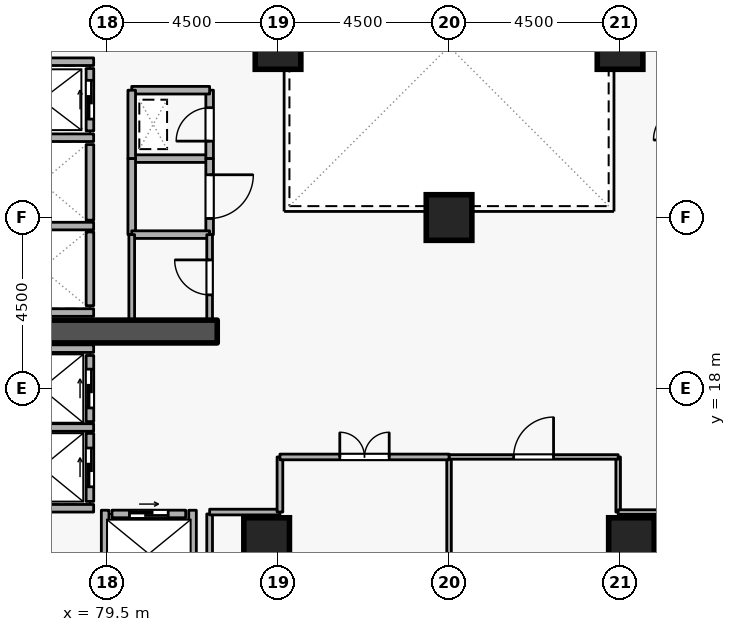
"""IFC4 building model, lengths in metres.
Left out: names, types, materials, properties, quantities, classifications, styles, units other than length and angle.
Written with IfcOpenShell. Run it as: python <this file> out.ifc"""

import sys

from ifc_helpers import new_model, si_unit, direction, frame, frame_2d, origin, origin_2d, place, context, subcontext, project, spatial, rectangle, extrude, element, fill, save


model = new_model("IFC4")
c1 = context("Model", 3, precision=1e-05, world=origin(), true_north=direction((0.0, 1.0)))
c2 = subcontext(c1, "Body", "Model", "MODEL_VIEW")
j1 = project(units=[si_unit("LENGTHUNIT", "METRE"), si_unit("PLANEANGLEUNIT", "RADIAN")], contexts=[c1])
p1 = place(None, origin())
s1 = spatial("IfcSite", under=j1, at=p1, CompositionType="ELEMENT")
p2 = place(p1, origin())
s2 = spatial("IfcBuilding", under=s1, at=p2, CompositionType="ELEMENT")
p3 = place(p2, frame((0.0, 0.0, 98.1)))
s3 = spatial("IfcBuildingStorey", under=s2, at=p3, CompositionType="ELEMENT", Elevation=98.1)
p4 = place(p3, frame((76.7, 19.5, 0.0), z_axis=(0.0, 0.0, 1.0), x_axis=(1.0, 0.0, 0.0)))
e1 = element("IfcWall", 1, at=p4, inside=s3, PredefinedType="SHEAR", context=c2, shape_type="SweptSolid", body=[
    extrude(rectangle(XDim=5.7, YDim=0.6, at=frame_2d((2.85, 0.0))), origin(), (0.0, 0.0, 1.0), 3.6),
])
for number, where, z_axis, x_axis in (
    (2, (93.3, 14.0, 0.0), (0.0, 0.0, 1.0), (1.0, 0.0, 0.0)),
    (3, (83.7, 14.0, 0.0), (0.0, 0.0, 1.0), (1.0, 0.0, 0.0)),
    (4, (93.0, 27.0, 0.0), (0.0, 0.0, 1.0), (1.0, 0.0, 0.0)),
    (5, (84.0, 27.0, 0.0), (0.0, 0.0, 1.0), (1.0, 0.0, 0.0)),
    (6, (88.5, 22.5, 0.0), (0.0, 0.0, 1.0), (1.0, 0.0, 0.0)),
):
    element("IfcColumn", number, at=place(p3, frame(where, z_axis=z_axis, x_axis=x_axis)), inside=s3, PredefinedType="COLUMN", context=c2, shape_type="SweptSolid", body=[
        extrude(rectangle(XDim=1.2, YDim=1.2, at=origin_2d()), origin(), (0.0, 0.0, 1.0), 3.6),
    ])
p5 = place(p3, frame((79.05, 24.78, 0.0), z_axis=(0.0, 0.0, 1.0), x_axis=(0.0, 1.0, 0.0)))
e7 = element("IfcWall", 7, at=p5, inside=s3, PredefinedType="STANDARD", context=c2, shape_type="SweptSolid", body=[
    extrude(rectangle(XDim=1.64, YDim=0.2, at=frame_2d((0.82, 0.0))), origin(), (0.0, 0.0, 1.0), 3.3),
])
p6 = place(p5, frame((0.31, 0.0, 0.0)))
e8 = element("IfcOpeningElement", 8, at=p6, cuts=e7, PredefinedType="OPENING", context=c2, shape_type="SweptSolid", body=[
    extrude(rectangle(XDim=1.02, YDim=2.06, at=frame_2d((0.51, 1.03))), frame((0.0, 0.11, 0.0), z_axis=(0.0, -1.0, 0.0), x_axis=(1.0, 0.0, 0.0)), (0.0, 0.0, 1.0), 0.22),
])
p7 = place(p3, frame((79.05, 22.43, 0.0), z_axis=(0.0, 0.0, 1.0), x_axis=(0.0, 1.0, 0.0)))
e9 = element("IfcWall", 9, at=p7, inside=s3, PredefinedType="STANDARD", context=c2, shape_type="SweptSolid", body=[
    extrude(rectangle(XDim=1.99, YDim=0.2, at=frame_2d((0.995, 0.0))), origin(), (0.0, 0.0, 1.0), 3.3),
])
p8 = place(p3, frame((79.05, 20.18, 0.0), z_axis=(0.0, 0.0, 1.0), x_axis=(0.0, 1.0, 0.0)))
e10 = element("IfcWall", 10, at=p8, inside=s3, PredefinedType="STANDARD", context=c2, shape_type="SweptSolid", body=[
    extrude(rectangle(XDim=1.94, YDim=0.2, at=frame_2d((0.97, 0.0))), origin(), (0.0, 0.0, 1.0), 3.3),
])
p9 = place(p3, frame((79.05, 17.13, 0.0), z_axis=(0.0, 0.0, 1.0), x_axis=(0.0, 1.0, 0.0)))
e11 = element("IfcWall", 11, at=p9, inside=s3, PredefinedType="STANDARD", context=c2, shape_type="SweptSolid", body=[
    extrude(rectangle(XDim=1.74, YDim=0.2, at=frame_2d((0.87, 0.0))), origin(), (0.0, 0.0, 1.0), 3.3),
])
p10 = place(p9, frame((0.36, 0.0, 0.0)))
e12 = element("IfcOpeningElement", 12, at=p10, cuts=e11, PredefinedType="OPENING", context=c2, shape_type="SweptSolid", body=[
    extrude(rectangle(XDim=1.02, YDim=2.06, at=frame_2d((0.51, 1.03))), frame((0.0, 0.11, 0.0), z_axis=(0.0, -1.0, 0.0), x_axis=(1.0, 0.0, 0.0)), (0.0, 0.0, 1.0), 0.22),
])
p11 = place(p3, frame((79.05, 15.03, 0.0), z_axis=(0.0, 0.0, 1.0), x_axis=(0.0, 1.0, 0.0)))
e13 = element("IfcWall", 13, at=p11, inside=s3, PredefinedType="STANDARD", context=c2, shape_type="SweptSolid", body=[
    extrude(rectangle(XDim=1.79, YDim=0.2, at=frame_2d((0.895, 0.0))), origin(), (0.0, 0.0, 1.0), 3.3),
])
p12 = place(p11, frame((0.385, 0.0, 0.0)))
e14 = element("IfcOpeningElement", 14, at=p12, cuts=e13, PredefinedType="OPENING", context=c2, shape_type="SweptSolid", body=[
    extrude(rectangle(XDim=1.02, YDim=2.06, at=frame_2d((0.51, 1.03))), frame((0.0, 0.11, 0.0), z_axis=(0.0, -1.0, 0.0), x_axis=(1.0, 0.0, 0.0)), (0.0, 0.0, 1.0), 0.22),
])
p13 = place(p3, frame((79.63, 14.7, 0.0), z_axis=(0.0, 0.0, 1.0), x_axis=(1.0, 0.0, 0.0)))
e15 = element("IfcWall", 15, at=p13, inside=s3, PredefinedType="STANDARD", context=c2, shape_type="SweptSolid", body=[
    extrude(rectangle(XDim=1.94, YDim=0.2, at=frame_2d((0.97, 0.0))), origin(), (0.0, 0.0, 1.0), 3.3),
])
p14 = place(p13, frame((0.46, 0.0, 0.0)))
e16 = element("IfcOpeningElement", 16, at=p14, cuts=e15, PredefinedType="OPENING", context=c2, shape_type="SweptSolid", body=[
    extrude(rectangle(XDim=1.02, YDim=2.06, at=frame_2d((0.51, 1.03))), frame((0.0, 0.11, 0.0), z_axis=(0.0, -1.0, 0.0), x_axis=(1.0, 0.0, 0.0)), (0.0, 0.0, 1.0), 0.22),
])
for number, where, z_axis, x_axis in (
    (17, (76.712, 26.6, 0.0), (0.0, 0.0, 1.0), (1.0, 0.0, 0.0)),
    (18, (76.712, 24.6, 0.0), (0.0, 0.0, 1.0), (1.0, 0.0, 0.0)),
    (19, (76.712, 22.275, 0.0), (0.0, 0.0, 1.0), (1.0, 0.0, 0.0)),
    (20, (76.712, 20.0, 0.0), (0.0, 0.0, 1.0), (1.0, 0.0, 0.0)),
):
    element("IfcWall", number, at=place(p3, frame(where, z_axis=z_axis, x_axis=x_axis)), inside=s3, PredefinedType="STANDARD", context=c2, shape_type="SweptSolid", body=[
        extrude(rectangle(XDim=2.436, YDim=0.2, at=frame_2d((1.218, 0.0))), origin(), (0.0, 0.0, 1.0), 3.3),
    ])
p15 = place(p3, frame((76.402, 19.05, 0.0), z_axis=(0.0, 0.0, 1.0), x_axis=(1.0, 0.0, 0.0)))
e21 = element("IfcWall", 21, at=p15, inside=s3, PredefinedType="STANDARD", context=c2, shape_type="SweptSolid", body=[
    extrude(rectangle(XDim=2.746, YDim=0.2, at=frame_2d((1.373, 0.0))), origin(), (0.0, 0.0, 1.0), 2.505),
])
p16 = place(p3, frame((76.402, 16.975, 0.0), z_axis=(0.0, 0.0, 1.0), x_axis=(1.0, 0.0, 0.0)))
e22 = element("IfcWall", 22, at=p16, inside=s3, PredefinedType="STANDARD", context=c2, shape_type="SweptSolid", body=[
    extrude(rectangle(XDim=2.746, YDim=0.2, at=frame_2d((1.373, 0.0))), origin(), (0.0, 0.0, 1.0), 3.3),
])
p17 = place(p3, frame((76.512, 14.85, 0.0), z_axis=(0.0, 0.0, 1.0), x_axis=(1.0, 0.0, 0.0)))
e23 = element("IfcWall", 23, at=p17, inside=s3, PredefinedType="STANDARD", context=c2, shape_type="SweptSolid", body=[
    extrude(rectangle(XDim=2.636, YDim=0.2, at=frame_2d((1.318, 0.0))), origin(), (0.0, 0.0, 1.0), 3.3),
])
for number, where, z_axis, x_axis in (
    (24, (81.75, 12.612, 0.0), (0.0, 0.0, 1.0), (0.0, 1.0, 0.0)),
    (25, (79.45, 12.612, 0.0), (0.0, 0.0, 1.0), (0.0, 1.0, 0.0)),
):
    element("IfcWall", number, at=place(p3, frame(where, z_axis=z_axis, x_axis=x_axis)), inside=s3, PredefinedType="STANDARD", context=c2, shape_type="SweptSolid", body=[
        extrude(rectangle(XDim=2.186, YDim=0.2, at=frame_2d((1.093, 0.0))), origin(), (0.0, 0.0, 1.0), 3.3),
    ])
p18 = place(p3, frame((80.15, 24.05, 0.0), z_axis=(0.0, 0.0, 1.0), x_axis=(1.0, 0.0, 0.0)))
e26 = element("IfcWall", 26, at=p18, inside=s3, PredefinedType="STANDARD", context=c2, shape_type="SweptSolid", body=[
    extrude(rectangle(XDim=2.05, YDim=0.2, at=frame_2d((1.025, 0.0))), origin(), (0.0, 0.0, 1.0), 3.3),
])
p19 = place(p3, frame((82.2, 24.05, 0.0), z_axis=(0.0, 0.0, 1.0), x_axis=(0.0, 1.0, 0.0)))
e27 = element("IfcWall", 27, at=p19, inside=s3, PredefinedType="STANDARD", context=c2, shape_type="SweptSolid", body=[
    extrude(rectangle(XDim=1.8, YDim=0.2, at=frame_2d((0.9, 0.0))), origin(), (0.0, 0.0, 1.0), 3.3),
])
p20 = place(p19, frame((0.46, 0.0, 0.0)))
e28 = element("IfcOpeningElement", 28, at=p20, cuts=e27, PredefinedType="OPENING", context=c2, shape_type="SweptSolid", body=[
    extrude(rectangle(XDim=0.88, YDim=2.04, at=frame_2d((0.44, 1.02))), frame((0.0, 0.11, 0.0), z_axis=(0.0, -1.0, 0.0), x_axis=(1.0, 0.0, 0.0)), (0.0, 0.0, 1.0), 0.22),
])
p21 = place(p3, frame((82.2, 25.85, 0.0), z_axis=(0.0, 0.0, 1.0), x_axis=(-1.0, 0.0, 0.0)))
e29 = element("IfcWall", 29, at=p21, inside=s3, PredefinedType="STANDARD", context=c2, shape_type="SweptSolid", body=[
    extrude(rectangle(XDim=2.05, YDim=0.2, at=frame_2d((1.025, 0.0))), origin(), (0.0, 0.0, 1.0), 3.3),
])
p22 = place(p3, frame((80.15, 25.85, 0.0), z_axis=(0.0, 0.0, 1.0), x_axis=(0.0, -1.0, 0.0)))
e30 = element("IfcWall", 30, at=p22, inside=s3, PredefinedType="STANDARD", context=c2, shape_type="SweptSolid", body=[
    extrude(rectangle(XDim=1.8, YDim=0.2, at=frame_2d((0.9, 0.0))), origin(), (0.0, 0.0, 1.0), 3.3),
])
p23 = place(p3, frame((80.15, 22.05, 0.0), z_axis=(0.0, 0.0, 1.0), x_axis=(0.0, 1.0, 0.0)))
e31 = element("IfcWall", 31, at=p23, inside=s3, PredefinedType="STANDARD", context=c2, shape_type="SweptSolid", body=[
    extrude(rectangle(XDim=2.0, YDim=0.2, at=frame_2d((1.0, 0.0))), origin(), (0.0, 0.0, 1.0), 3.3),
])
p24 = place(p3, frame((82.2, 24.05, 0.0), z_axis=(0.0, 0.0, 1.0), x_axis=(0.0, -1.0, 0.0)))
e32 = element("IfcWall", 32, at=p24, inside=s3, PredefinedType="STANDARD", context=c2, shape_type="SweptSolid", body=[
    extrude(rectangle(XDim=2.0, YDim=0.2, at=frame_2d((1.0, 0.0))), origin(), (0.0, 0.0, 1.0), 3.3),
])
p25 = place(p24, frame((0.425, 0.0, 0.0)))
e33 = element("IfcOpeningElement", 33, at=p25, cuts=e32, PredefinedType="OPENING", context=c2, shape_type="SweptSolid", body=[
    extrude(rectangle(XDim=1.15, YDim=2.1, at=frame_2d((0.575, 1.05))), frame((0.0, 0.11, 0.0), z_axis=(0.0, -1.0, 0.0), x_axis=(1.0, 0.0, 0.0)), (0.0, 0.0, 1.0), 0.22),
])
p26 = place(p3, frame((82.2, 22.05, 0.0), z_axis=(0.0, 0.0, 1.0), x_axis=(-1.0, 0.0, 0.0)))
e34 = element("IfcWall", 34, at=p26, inside=s3, PredefinedType="STANDARD", context=c2, shape_type="SweptSolid", body=[
    extrude(rectangle(XDim=2.05, YDim=0.2, at=frame_2d((1.025, 0.0))), origin(), (0.0, 0.0, 1.0), 3.3),
])
p27 = place(p3, frame((82.2, 19.8, 0.0), z_axis=(0.0, 0.0, 1.0), x_axis=(0.0, 1.0, 0.0)))
e35 = element("IfcWall", 35, at=p27, inside=s3, PredefinedType="PARTITIONING", context=c2, shape_type="SweptSolid", body=[
    extrude(rectangle(XDim=2.25, YDim=0.15, at=frame_2d((1.125, 0.0))), origin(), (0.0, 0.0, 1.0), 3.3),
])
p28 = place(p27, frame((0.665, 0.0, 0.0)))
e36 = element("IfcOpeningElement", 36, at=p28, cuts=e35, PredefinedType="OPENING", context=c2, shape_type="SweptSolid", body=[
    extrude(rectangle(XDim=0.92, YDim=2.08, at=frame_2d((0.46, 1.04))), frame((0.0, 0.085, 0.0), z_axis=(0.0, -1.0, 0.0), x_axis=(1.0, 0.0, 0.0)), (0.0, 0.0, 1.0), 0.17),
])
p29 = place(p3, frame((80.15, 22.05, 0.0), z_axis=(0.0, 0.0, 1.0), x_axis=(0.0, -1.0, 0.0)))
e37 = element("IfcWall", 37, at=p29, inside=s3, PredefinedType="PARTITIONING", context=c2, shape_type="SweptSolid", body=[
    extrude(rectangle(XDim=2.25, YDim=0.15, at=frame_2d((1.125, 0.0))), origin(), (0.0, 0.0, 1.0), 3.3),
])
p30 = place(p3, frame((92.95, 16.2, 0.0), z_axis=(0.0, 0.0, 1.0), x_axis=(0.0, -1.0, 0.0)))
e38 = element("IfcWall", 38, at=p30, inside=s3, PredefinedType="PARTITIONING", context=c2, shape_type="SweptSolid", body=[
    extrude(rectangle(XDim=1.45, YDim=0.12, at=frame_2d((0.725, 0.0))), origin(), (0.0, 0.0, 1.0), 3.3),
])
p31 = place(p3, frame((92.95, 14.75, 0.0), z_axis=(0.0, 0.0, 1.0), x_axis=(1.0, 0.0, 0.0)))
e39 = element("IfcWall", 39, at=p31, inside=s3, PredefinedType="PARTITIONING", context=c2, shape_type="SweptSolid", body=[
    extrude(rectangle(XDim=1.85, YDim=0.12, at=frame_2d((0.925, 0.0))), origin(), (0.0, 0.0, 1.0), 3.3),
])
p32 = place(p3, frame((88.5, 3.08, 0.0), z_axis=(0.0, 0.0, 1.0), x_axis=(0.0, 1.0, 0.0)))
e40 = element("IfcWall", 40, at=p32, inside=s3, PredefinedType="PARTITIONING", context=c2, shape_type="SweptSolid", body=[
    extrude(rectangle(XDim=13.12, YDim=0.12, at=frame_2d((6.56, 0.0))), origin(), (0.0, 0.0, 1.0), 2.838),
])
p33 = place(p3, frame((88.5, 16.2, 0.0), z_axis=(0.0, 0.0, 1.0), x_axis=(1.0, 0.0, 0.0)))
e41 = element("IfcWall", 41, at=p33, inside=s3, PredefinedType="PARTITIONING", context=c2, shape_type="SweptSolid", body=[
    extrude(rectangle(XDim=4.45, YDim=0.12, at=frame_2d((2.225, 0.0))), origin(), (0.0, 0.0, 1.0), 3.3),
])
p34 = place(p33, frame((1.7, 0.0, 0.0)))
e42 = element("IfcOpeningElement", 42, at=p34, cuts=e41, PredefinedType="OPENING", context=c2, shape_type="SweptSolid", body=[
    extrude(rectangle(XDim=1.05, YDim=2.1, at=frame_2d((0.525, 1.05))), frame((0.0, 0.07, 0.0), z_axis=(0.0, -1.0, 0.0), x_axis=(1.0, 0.0, 0.0)), (0.0, 0.0, 1.0), 0.14),
])
p35 = place(p3, frame((82.2, 12.4, 0.0), z_axis=(0.0, 0.0, 1.0), x_axis=(0.0, 1.0, 0.0)))
e43 = element("IfcWall", 43, at=p35, inside=s3, PredefinedType="PARTITIONING", context=c2, shape_type="SweptSolid", body=[
    extrude(rectangle(XDim=2.3, YDim=0.15, at=frame_2d((1.15, 0.0))), origin(), (0.0, 0.0, 1.0), 3.3),
])
p36 = place(p3, frame((82.2, 14.75, 0.0), z_axis=(0.0, 0.0, 1.0), x_axis=(1.0, 0.0, 0.0)))
e44 = element("IfcWall", 44, at=p36, inside=s3, PredefinedType="PARTITIONING", context=c2, shape_type="SweptSolid", body=[
    extrude(rectangle(XDim=1.85, YDim=0.15, at=frame_2d((0.925, 0.0))), origin(), (0.0, 0.0, 1.0), 3.3),
])
p37 = place(p3, frame((84.05, 14.75, 0.0), z_axis=(0.0, 0.0, 1.0), x_axis=(0.0, 1.0, 0.0)))
e45 = element("IfcWall", 45, at=p37, inside=s3, PredefinedType="PARTITIONING", context=c2, shape_type="SweptSolid", body=[
    extrude(rectangle(XDim=1.45, YDim=0.15, at=frame_2d((0.725, 0.0))), origin(), (0.0, 0.0, 1.0), 3.3),
])
p38 = place(p3, frame((84.05, 16.2, 0.0), z_axis=(0.0, 0.0, 1.0), x_axis=(1.0, 0.0, 0.0)))
e46 = element("IfcWall", 46, at=p38, inside=s3, PredefinedType="PARTITIONING", context=c2, shape_type="SweptSolid", body=[
    extrude(rectangle(XDim=4.45, YDim=0.15, at=frame_2d((2.225, 0.0))), origin(), (0.0, 0.0, 1.0), 3.3),
])
p39 = place(p38, frame((1.575, 0.0, 0.0)))
e47 = element("IfcOpeningElement", 47, at=p39, cuts=e46, PredefinedType="OPENING", context=c2, shape_type="SweptSolid", body=[
    extrude(rectangle(XDim=1.3, YDim=2.12, at=frame_2d((0.65, 1.06))), frame((0.0, 0.085, 0.0), z_axis=(0.0, -1.0, 0.0), x_axis=(1.0, 0.0, 0.0)), (0.0, 0.0, 1.0), 0.17),
])
p40 = place(p6, origin())
e48 = element("IfcDoor", 48, at=p40, inside=s3, OperationType="SLIDING_TO_LEFT", PredefinedType="DOOR", context=c2, shape_type="SweptSolid", body=[
    extrude(rectangle(XDim=1.02, YDim=2.06, at=frame_2d((0.51, 1.03))), frame((0.0, 0.025, 0.0), z_axis=(0.0, -1.0, 0.0), x_axis=(1.0, 0.0, 0.0)), (0.0, 0.0, 1.0), 0.05),
])
fill(e8, e48)
p41 = place(p10, origin())
e49 = element("IfcDoor", 49, at=p41, inside=s3, OperationType="SLIDING_TO_LEFT", PredefinedType="DOOR", context=c2, shape_type="SweptSolid", body=[
    extrude(rectangle(XDim=1.02, YDim=2.06, at=frame_2d((0.51, 1.03))), frame((0.0, 0.025, 0.0), z_axis=(0.0, -1.0, 0.0), x_axis=(1.0, 0.0, 0.0)), (0.0, 0.0, 1.0), 0.05),
])
fill(e12, e49)
p42 = place(p12, origin())
e50 = element("IfcDoor", 50, at=p42, inside=s3, OperationType="SLIDING_TO_LEFT", PredefinedType="DOOR", context=c2, shape_type="SweptSolid", body=[
    extrude(rectangle(XDim=1.02, YDim=2.06, at=frame_2d((0.51, 1.03))), frame((0.0, 0.025, 0.0), z_axis=(0.0, -1.0, 0.0), x_axis=(1.0, 0.0, 0.0)), (0.0, 0.0, 1.0), 0.05),
])
fill(e14, e50)
p43 = place(p14, origin())
e51 = element("IfcDoor", 51, at=p43, inside=s3, OperationType="SLIDING_TO_LEFT", PredefinedType="DOOR", context=c2, shape_type="SweptSolid", body=[
    extrude(rectangle(XDim=1.02, YDim=2.06, at=frame_2d((0.51, 1.03))), frame((0.0, 0.025, 0.0), z_axis=(0.0, -1.0, 0.0), x_axis=(1.0, 0.0, 0.0)), (0.0, 0.0, 1.0), 0.05),
])
fill(e16, e51)
p44 = place(p20, origin())
e52 = element("IfcDoor", 52, at=p44, inside=s3, OperationType="SINGLE_SWING_LEFT", PredefinedType="DOOR", context=c2, shape_type="SweptSolid", body=[
    extrude(rectangle(XDim=0.88, YDim=2.04, at=frame_2d((0.44, 1.02))), frame((0.0, 0.025, 0.0), z_axis=(0.0, -1.0, 0.0), x_axis=(1.0, 0.0, 0.0)), (0.0, 0.0, 1.0), 0.05),
])
fill(e28, e52)
p45 = place(p28, origin())
e53 = element("IfcDoor", 53, at=p45, inside=s3, OperationType="SINGLE_SWING_RIGHT", PredefinedType="DOOR", context=c2, shape_type="SweptSolid", body=[
    extrude(rectangle(XDim=0.92, YDim=2.08, at=frame_2d((0.46, 1.04))), frame((0.0, 0.025, 0.0), z_axis=(0.0, -1.0, 0.0), x_axis=(1.0, 0.0, 0.0)), (0.0, 0.0, 1.0), 0.05),
])
fill(e36, e53)
p46 = place(p25, origin())
e54 = element("IfcDoor", 54, at=p46, inside=s3, OperationType="SINGLE_SWING_LEFT", PredefinedType="DOOR", context=c2, shape_type="SweptSolid", body=[
    extrude(rectangle(XDim=1.15, YDim=2.1, at=frame_2d((0.575, 1.05))), frame((0.0, 0.025, 0.0), z_axis=(0.0, -1.0, 0.0), x_axis=(1.0, 0.0, 0.0)), (0.0, 0.0, 1.0), 0.05),
])
fill(e33, e54)
p47 = place(p34, origin())
e55 = element("IfcDoor", 55, at=p47, inside=s3, OperationType="SINGLE_SWING_RIGHT", PredefinedType="DOOR", context=c2, shape_type="SweptSolid", body=[
    extrude(rectangle(XDim=1.05, YDim=2.1, at=frame_2d((0.525, 1.05))), frame((0.0, 0.025, 0.0), z_axis=(0.0, -1.0, 0.0), x_axis=(1.0, 0.0, 0.0)), (0.0, 0.0, 1.0), 0.05),
])
fill(e42, e55)
p48 = place(p39, origin())
e56 = element("IfcDoor", 56, at=p48, inside=s3, OperationType="DOUBLE_DOOR_SINGLE_SWING", PredefinedType="DOOR", context=c2, shape_type="SweptSolid", body=[
    extrude(rectangle(XDim=1.3, YDim=2.12, at=frame_2d((0.65, 1.06))), frame((0.0, 0.025, 0.0), z_axis=(0.0, -1.0, 0.0), x_axis=(1.0, 0.0, 0.0)), (0.0, 0.0, 1.0), 0.05),
])
fill(e47, e56)
save(model, sys.argv[1])
